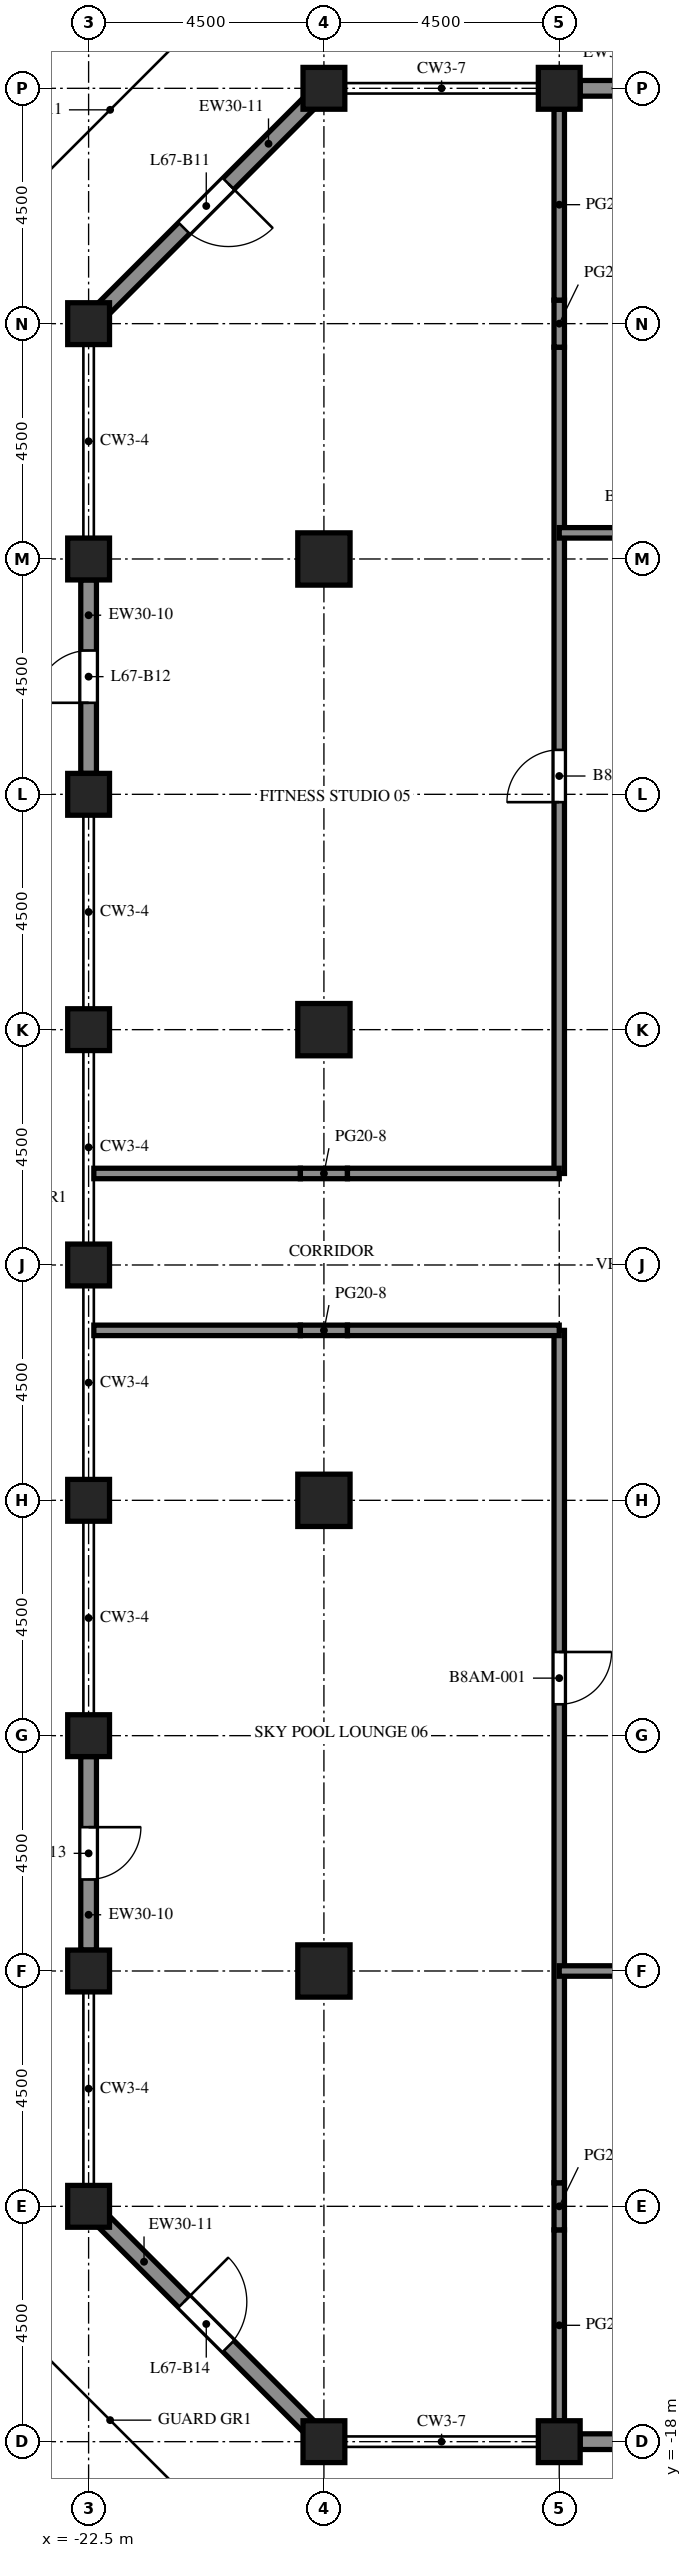
"""IFC4 building model, lengths in metres.
Left out: names, types, materials, properties, quantities, classifications, styles, units other than length and angle.
Written with IfcOpenShell. Run it as: python <this file> out.ifc"""

import sys

from ifc_helpers import new_model, si_unit, direction, frame, frame_2d, origin, origin_2d, place, context, subcontext, project, spatial, rectangle, extrude, element, fill, save


model = new_model("IFC4")
c1 = context("Model", 3, precision=1e-05, world=origin(), true_north=direction((0.0, 1.0)))
c2 = subcontext(c1, "Body", "Model", "MODEL_VIEW")
j1 = project(units=[si_unit("LENGTHUNIT", "METRE"), si_unit("PLANEANGLEUNIT", "RADIAN")], contexts=[c1])
p1 = place(None, origin())
s1 = spatial("IfcSite", under=j1, at=p1, CompositionType="ELEMENT")
p2 = place(p1, origin())
s2 = spatial("IfcBuilding", under=s1, at=p2, CompositionType="ELEMENT")
p3 = place(p2, frame((0.0, 0.0, 295.0)))
s3 = spatial("IfcBuildingStorey", under=s2, at=p3, CompositionType="ELEMENT", Elevation=295.0)
for number, where, z_axis, x_axis in (
    (1, (-22.5, -13.5, 0.0), (0.0, 0.0, 1.0), (1.0, 0.0, 0.0)),
    (2, (-22.5, -9.0, 0.0), (0.0, 0.0, 1.0), (1.0, 0.0, 0.0)),
    (3, (-22.5, -4.5, 0.0), (0.0, 0.0, 1.0), (1.0, 0.0, 0.0)),
    (4, (-22.5, 0.0, 0.0), (0.0, 0.0, 1.0), (1.0, 0.0, 0.0)),
    (5, (-22.5, 4.5, 0.0), (0.0, 0.0, 1.0), (1.0, 0.0, 0.0)),
    (6, (-22.5, 9.0, 0.0), (0.0, 0.0, 1.0), (1.0, 0.0, 0.0)),
    (7, (-22.5, 13.5, 0.0), (0.0, 0.0, 1.0), (1.0, 0.0, 0.0)),
    (8, (-22.5, 18.0, 0.0), (0.0, 0.0, 1.0), (1.0, 0.0, 0.0)),
    (9, (-22.5, 22.5, 0.0), (0.0, 0.0, 1.0), (1.0, 0.0, 0.0)),
):
    element("IfcColumn", number, at=place(p3, frame(where, z_axis=z_axis, x_axis=x_axis)), inside=s3, PredefinedType="COLUMN", context=c2, shape_type="SweptSolid", body=[
        extrude(rectangle(XDim=0.8, YDim=0.8, at=origin_2d()), origin(), (0.0, 0.0, 1.0), 6.0),
    ])
for number, where, z_axis, x_axis in (
    (10, (-18.0, -18.0, 0.0), (0.0, 0.0, 1.0), (1.0, 0.0, 0.0)),
    (11, (-18.0, 27.0, 0.0), (0.0, 0.0, 1.0), (1.0, 0.0, 0.0)),
):
    element("IfcColumn", number, at=place(p3, frame(where, z_axis=z_axis, x_axis=x_axis)), inside=s3, PredefinedType="COLUMN", context=c2, shape_type="SweptSolid", body=[
        extrude(rectangle(XDim=0.8, YDim=0.8, at=origin_2d()), origin(), (0.0, 0.0, 1.0), 3.6),
    ])
for number, where, z_axis, x_axis in (
    (12, (-13.5, -18.0, 0.0), (0.0, 0.0, 1.0), (1.0, 0.0, 0.0)),
    (13, (-13.5, 27.0, 0.0), (0.0, 0.0, 1.0), (1.0, 0.0, 0.0)),
):
    element("IfcColumn", number, at=place(p3, frame(where, z_axis=z_axis, x_axis=x_axis)), inside=s3, PredefinedType="COLUMN", context=c2, shape_type="SweptSolid", body=[
        extrude(rectangle(XDim=0.8, YDim=0.8, at=origin_2d()), origin(), (0.0, 0.0, 1.0), 6.0),
    ])
for number, where, z_axis, x_axis in (
    (14, (-18.0, -9.0, 0.0), (0.0, 0.0, 1.0), (1.0, 0.0, 0.0)),
    (15, (-18.0, 0.0, 0.0), (0.0, 0.0, 1.0), (1.0, 0.0, 0.0)),
    (16, (-18.0, 9.0, 0.0), (0.0, 0.0, 1.0), (1.0, 0.0, 0.0)),
    (17, (-18.0, 18.0, 0.0), (0.0, 0.0, 1.0), (1.0, 0.0, 0.0)),
):
    element("IfcColumn", number, at=place(p3, frame(where, z_axis=z_axis, x_axis=x_axis)), inside=s3, PredefinedType="COLUMN", context=c2, shape_type="SweptSolid", body=[
        extrude(rectangle(XDim=1.0, YDim=1.0, at=origin_2d()), origin(), (0.0, 0.0, 1.0), 5.4),
    ])
p4 = place(p3, frame((-9.4, -18.0, 0.0), z_axis=(0.0, 0.0, 1.0), x_axis=(-1.0, 0.0, 0.0)))
e18 = element("IfcWall", 18, at=p4, inside=s3, PredefinedType="SOLIDWALL", context=c2, shape_type="SweptSolid", body=[
    extrude(rectangle(XDim=3.7, YDim=0.3, at=frame_2d((1.85, 0.0))), origin(), (0.0, 0.0, 1.0), 3.6),
])
p5 = place(p4, frame((1.35, 0.0, 0.0)))
e19 = element("IfcOpeningElement", 19, at=p5, cuts=e18, PredefinedType="OPENING", context=c2, shape_type="SweptSolid", body=[
    extrude(rectangle(XDim=1.0, YDim=2.2, at=frame_2d((0.5, 1.1))), frame((0.0, 0.16, 0.0), z_axis=(0.0, -1.0, 0.0), x_axis=(1.0, 0.0, 0.0)), (0.0, 0.0, 1.0), 0.32),
])
p6 = place(p3, frame((-13.1, 27.0, 0.0), z_axis=(0.0, 0.0, 1.0), x_axis=(1.0, 0.0, 0.0)))
e20 = element("IfcWall", 20, at=p6, inside=s3, PredefinedType="SOLIDWALL", context=c2, shape_type="SweptSolid", body=[
    extrude(rectangle(XDim=3.7, YDim=0.3, at=frame_2d((1.85, 0.0))), origin(), (0.0, 0.0, 1.0), 4.6),
])
p7 = place(p6, frame((1.35, 0.0, 0.0)))
e21 = element("IfcOpeningElement", 21, at=p7, cuts=e20, PredefinedType="OPENING", context=c2, shape_type="SweptSolid", body=[
    extrude(rectangle(XDim=1.0, YDim=2.2, at=frame_2d((0.5, 1.1))), frame((0.0, 0.16, 0.0), z_axis=(0.0, -1.0, 0.0), x_axis=(1.0, 0.0, 0.0)), (0.0, 0.0, 1.0), 0.32),
])
p8 = place(p3, frame((-22.206, 22.794, 0.0), z_axis=(0.0, 0.0, 1.0), x_axis=(0.707106781187, 0.707106781187, 0.0)))
e22 = element("IfcWall", 22, at=p8, inside=s3, PredefinedType="SOLIDWALL", context=c2, shape_type="SweptSolid", body=[
    extrude(rectangle(XDim=5.532, YDim=0.3, at=frame_2d((2.766, 0.0))), origin(), (0.0, 0.0, 1.0), 3.6),
])
p9 = place(p8, frame((2.166, 0.0, 0.0)))
e23 = element("IfcOpeningElement", 23, at=p9, cuts=e22, PredefinedType="OPENING", context=c2, shape_type="SweptSolid", body=[
    extrude(rectangle(XDim=1.2, YDim=2.2, at=frame_2d((0.6, 1.1))), frame((0.0, 0.16, 0.0), z_axis=(0.0, -1.0, 0.0), x_axis=(1.0, 0.0, 0.0)), (0.0, 0.0, 1.0), 0.32),
])
p10 = place(p3, frame((-22.5, 13.9, 0.0), z_axis=(0.0, 0.0, 1.0), x_axis=(0.0, 1.0, 0.0)))
e24 = element("IfcWall", 24, at=p10, inside=s3, PredefinedType="SOLIDWALL", context=c2, shape_type="SweptSolid", body=[
    extrude(rectangle(XDim=3.7, YDim=0.3, at=frame_2d((1.85, 0.0))), origin(), (0.0, 0.0, 1.0), 4.6),
])
p11 = place(p10, frame((1.35, 0.0, 0.0)))
e25 = element("IfcOpeningElement", 25, at=p11, cuts=e24, PredefinedType="OPENING", context=c2, shape_type="SweptSolid", body=[
    extrude(rectangle(XDim=1.0, YDim=2.2, at=frame_2d((0.5, 1.1))), frame((0.0, 0.16, 0.0), z_axis=(0.0, -1.0, 0.0), x_axis=(1.0, 0.0, 0.0)), (0.0, 0.0, 1.0), 0.32),
])
p12 = place(p3, frame((-22.5, -8.6, 0.0), z_axis=(0.0, 0.0, 1.0), x_axis=(0.0, 1.0, 0.0)))
e26 = element("IfcWall", 26, at=p12, inside=s3, PredefinedType="SOLIDWALL", context=c2, shape_type="SweptSolid", body=[
    extrude(rectangle(XDim=3.7, YDim=0.3, at=frame_2d((1.85, 0.0))), origin(), (0.0, 0.0, 1.0), 4.6),
])
p13 = place(p12, frame((1.35, 0.0, 0.0)))
e27 = element("IfcOpeningElement", 27, at=p13, cuts=e26, PredefinedType="OPENING", context=c2, shape_type="SweptSolid", body=[
    extrude(rectangle(XDim=1.0, YDim=2.2, at=frame_2d((0.5, 1.1))), frame((0.0, 0.16, 0.0), z_axis=(0.0, -1.0, 0.0), x_axis=(1.0, 0.0, 0.0)), (0.0, 0.0, 1.0), 0.32),
])
p14 = place(p3, frame((-18.294, -17.706, 0.0), z_axis=(0.0, 0.0, 1.0), x_axis=(-0.707106781187, 0.707106781187, 0.0)))
e28 = element("IfcWall", 28, at=p14, inside=s3, PredefinedType="SOLIDWALL", context=c2, shape_type="SweptSolid", body=[
    extrude(rectangle(XDim=5.532, YDim=0.3, at=frame_2d((2.766, 0.0))), origin(), (0.0, 0.0, 1.0), 3.6),
])
p15 = place(p14, frame((2.166, 0.0, 0.0)))
e29 = element("IfcOpeningElement", 29, at=p15, cuts=e28, PredefinedType="OPENING", context=c2, shape_type="SweptSolid", body=[
    extrude(rectangle(XDim=1.2, YDim=2.2, at=frame_2d((0.6, 1.1))), frame((0.0, 0.16, 0.0), z_axis=(0.0, -1.0, 0.0), x_axis=(1.0, 0.0, 0.0)), (0.0, 0.0, 1.0), 0.32),
])
p16 = place(p3, frame((-13.5, -17.6, 0.0), z_axis=(0.0, 0.0, 1.0), x_axis=(0.0, 1.0, 0.0)))
e30 = element("IfcWall", 30, at=p16, inside=s3, PredefinedType="PARTITIONING", context=c2, shape_type="SweptSolid", body=[
    extrude(rectangle(XDim=3.65, YDim=0.2, at=frame_2d((1.825, 0.0))), origin(), (0.0, 0.0, 1.0), 4.77),
])
p17 = place(p3, frame((-13.5, -13.95, 0.0), z_axis=(0.0, 0.0, 1.0), x_axis=(0.0, 1.0, 0.0)))
e31 = element("IfcWall", 31, at=p17, inside=s3, PredefinedType="PARTITIONING", context=c2, shape_type="SweptSolid", body=[
    extrude(rectangle(XDim=0.9, YDim=0.2, at=frame_2d((0.45, 0.0))), origin(), (0.0, 0.0, 1.0), 3.57),
])
p18 = place(p3, frame((-13.5, -13.05, 0.0), z_axis=(0.0, 0.0, 1.0), x_axis=(0.0, 1.0, 0.0)))
e32 = element("IfcWall", 32, at=p18, inside=s3, PredefinedType="PARTITIONING", context=c2, shape_type="SweptSolid", body=[
    extrude(rectangle(XDim=16.3, YDim=0.2, at=frame_2d((8.15, 0.0))), origin(), (0.0, 0.0, 1.0), 5.4),
])
p19 = place(p18, frame((9.15, 0.0, 0.0)))
e33 = element("IfcOpeningElement", 33, at=p19, cuts=e32, PredefinedType="OPENING", context=c2, shape_type="SweptSolid", body=[
    extrude(rectangle(XDim=1.0, YDim=2.1, at=frame_2d((0.5, 1.05))), frame((0.0, 0.11, 0.0), z_axis=(0.0, -1.0, 0.0), x_axis=(1.0, 0.0, 0.0)), (0.0, 0.0, 1.0), 0.22),
])
p20 = place(p3, frame((-13.5, 6.25, 0.0), z_axis=(0.0, 0.0, 1.0), x_axis=(0.0, 1.0, 0.0)))
e34 = element("IfcWall", 34, at=p20, inside=s3, PredefinedType="PARTITIONING", context=c2, shape_type="SweptSolid", body=[
    extrude(rectangle(XDim=15.8, YDim=0.2, at=frame_2d((7.9, 0.0))), origin(), (0.0, 0.0, 1.0), 5.4),
])
p21 = place(p20, frame((7.1, 0.0, 0.0)))
e35 = element("IfcOpeningElement", 35, at=p21, cuts=e34, PredefinedType="OPENING", context=c2, shape_type="SweptSolid", body=[
    extrude(rectangle(XDim=1.0, YDim=2.1, at=frame_2d((0.5, 1.05))), frame((0.0, 0.11, 0.0), z_axis=(0.0, -1.0, 0.0), x_axis=(1.0, 0.0, 0.0)), (0.0, 0.0, 1.0), 0.22),
])
p22 = place(p3, frame((-13.5, 22.05, 0.0), z_axis=(0.0, 0.0, 1.0), x_axis=(0.0, 1.0, 0.0)))
e36 = element("IfcWall", 36, at=p22, inside=s3, PredefinedType="PARTITIONING", context=c2, shape_type="SweptSolid", body=[
    extrude(rectangle(XDim=0.9, YDim=0.2, at=frame_2d((0.45, 0.0))), origin(), (0.0, 0.0, 1.0), 3.57),
])
p23 = place(p3, frame((-13.5, 22.95, 0.0), z_axis=(0.0, 0.0, 1.0), x_axis=(0.0, 1.0, 0.0)))
e37 = element("IfcWall", 37, at=p23, inside=s3, PredefinedType="PARTITIONING", context=c2, shape_type="SweptSolid", body=[
    extrude(rectangle(XDim=3.65, YDim=0.2, at=frame_2d((1.825, 0.0))), origin(), (0.0, 0.0, 1.0), 4.77),
])
p24 = place(p3, frame((-10.5, -9.0, 0.0), z_axis=(0.0, 0.0, 1.0), x_axis=(-1.0, 0.0, 0.0)))
e38 = element("IfcWall", 38, at=p24, inside=s3, PredefinedType="PARTITIONING", context=c2, shape_type="SweptSolid", body=[
    extrude(rectangle(XDim=3.0, YDim=0.2, at=frame_2d((1.5, 0.0))), origin(), (0.0, 0.0, 1.0), 5.4),
])
p25 = place(p24, frame((0.65, 0.0, 0.0)))
e39 = element("IfcOpeningElement", 39, at=p25, cuts=e38, PredefinedType="OPENING", context=c2, shape_type="SweptSolid", body=[
    extrude(rectangle(XDim=1.0, YDim=2.1, at=frame_2d((0.5, 1.05))), frame((0.0, 0.11, 0.0), z_axis=(0.0, -1.0, 0.0), x_axis=(1.0, 0.0, 0.0)), (0.0, 0.0, 1.0), 0.22),
])
p26 = place(p3, frame((-22.4, 3.25, 0.0), z_axis=(0.0, 0.0, 1.0), x_axis=(1.0, 0.0, 0.0)))
e40 = element("IfcWall", 40, at=p26, inside=s3, PredefinedType="PARTITIONING", context=c2, shape_type="SweptSolid", body=[
    extrude(rectangle(XDim=3.95, YDim=0.2, at=frame_2d((1.975, 0.0))), origin(), (0.0, 0.0, 1.0), 5.4),
])
p27 = place(p3, frame((-18.45, 3.25, 0.0), z_axis=(0.0, 0.0, 1.0), x_axis=(1.0, 0.0, 0.0)))
e41 = element("IfcWall", 41, at=p27, inside=s3, PredefinedType="PARTITIONING", context=c2, shape_type="SweptSolid", body=[
    extrude(rectangle(XDim=0.9, YDim=0.2, at=frame_2d((0.45, 0.0))), origin(), (0.0, 0.0, 1.0), 3.57),
])
p28 = place(p3, frame((-17.55, 3.25, 0.0), z_axis=(0.0, 0.0, 1.0), x_axis=(1.0, 0.0, 0.0)))
e42 = element("IfcWall", 42, at=p28, inside=s3, PredefinedType="PARTITIONING", context=c2, shape_type="SweptSolid", body=[
    extrude(rectangle(XDim=4.05, YDim=0.2, at=frame_2d((2.025, 0.0))), origin(), (0.0, 0.0, 1.0), 5.4),
])
p29 = place(p3, frame((-22.4, 6.25, 0.0), z_axis=(0.0, 0.0, 1.0), x_axis=(1.0, 0.0, 0.0)))
e43 = element("IfcWall", 43, at=p29, inside=s3, PredefinedType="PARTITIONING", context=c2, shape_type="SweptSolid", body=[
    extrude(rectangle(XDim=3.95, YDim=0.2, at=frame_2d((1.975, 0.0))), origin(), (0.0, 0.0, 1.0), 5.4),
])
p30 = place(p3, frame((-18.45, 6.25, 0.0), z_axis=(0.0, 0.0, 1.0), x_axis=(1.0, 0.0, 0.0)))
e44 = element("IfcWall", 44, at=p30, inside=s3, PredefinedType="PARTITIONING", context=c2, shape_type="SweptSolid", body=[
    extrude(rectangle(XDim=0.9, YDim=0.2, at=frame_2d((0.45, 0.0))), origin(), (0.0, 0.0, 1.0), 3.57),
])
p31 = place(p3, frame((-17.55, 6.25, 0.0), z_axis=(0.0, 0.0, 1.0), x_axis=(1.0, 0.0, 0.0)))
e45 = element("IfcWall", 45, at=p31, inside=s3, PredefinedType="PARTITIONING", context=c2, shape_type="SweptSolid", body=[
    extrude(rectangle(XDim=4.05, YDim=0.2, at=frame_2d((2.025, 0.0))), origin(), (0.0, 0.0, 1.0), 5.4),
])
p32 = place(p3, frame((-13.5, 18.5, 0.0), z_axis=(0.0, 0.0, 1.0), x_axis=(1.0, 0.0, 0.0)))
e46 = element("IfcWall", 46, at=p32, inside=s3, PredefinedType="PARTITIONING", context=c2, shape_type="SweptSolid", body=[
    extrude(rectangle(XDim=3.0, YDim=0.2, at=frame_2d((1.5, 0.0))), origin(), (0.0, 0.0, 1.0), 5.4),
])
p33 = place(p32, frame((1.1, 0.0, 0.0)))
e47 = element("IfcOpeningElement", 47, at=p33, cuts=e46, PredefinedType="OPENING", context=c2, shape_type="SweptSolid", body=[
    extrude(rectangle(XDim=1.0, YDim=2.1, at=frame_2d((0.5, 1.05))), frame((0.0, 0.11, 0.0), z_axis=(0.0, -1.0, 0.0), x_axis=(1.0, 0.0, 0.0)), (0.0, 0.0, 1.0), 0.22),
])
p34 = place(p9, origin())
e48 = element("IfcDoor", 48, at=p34, inside=s3, OperationType="SINGLE_SWING_RIGHT", PredefinedType="DOOR", context=c2, shape_type="SweptSolid", body=[
    extrude(rectangle(XDim=1.2, YDim=2.2, at=frame_2d((0.6, 1.1))), frame((0.0, 0.025, 0.0), z_axis=(0.0, -1.0, 0.0), x_axis=(1.0, 0.0, 0.0)), (0.0, 0.0, 1.0), 0.05),
])
fill(e23, e48)
p35 = place(p11, origin())
e49 = element("IfcDoor", 49, at=p35, inside=s3, OperationType="SINGLE_SWING_LEFT", PredefinedType="DOOR", context=c2, shape_type="SweptSolid", body=[
    extrude(rectangle(XDim=1.0, YDim=2.2, at=frame_2d((0.5, 1.1))), frame((0.0, 0.025, 0.0), z_axis=(0.0, -1.0, 0.0), x_axis=(1.0, 0.0, 0.0)), (0.0, 0.0, 1.0), 0.05),
])
fill(e25, e49)
p36 = place(p13, origin())
e50 = element("IfcDoor", 50, at=p36, inside=s3, OperationType="SINGLE_SWING_RIGHT", PredefinedType="DOOR", context=c2, shape_type="SweptSolid", body=[
    extrude(rectangle(XDim=1.0, YDim=2.2, at=frame_2d((0.5, 1.1))), frame((0.0, 0.025, 0.0), z_axis=(0.0, -1.0, 0.0), x_axis=(1.0, 0.0, 0.0)), (0.0, 0.0, 1.0), 0.05),
])
fill(e27, e50)
p37 = place(p15, origin())
e51 = element("IfcDoor", 51, at=p37, inside=s3, OperationType="SINGLE_SWING_RIGHT", PredefinedType="DOOR", context=c2, shape_type="SweptSolid", body=[
    extrude(rectangle(XDim=1.2, YDim=2.2, at=frame_2d((0.6, 1.1))), frame((0.0, 0.025, 0.0), z_axis=(0.0, -1.0, 0.0), x_axis=(1.0, 0.0, 0.0)), (0.0, 0.0, 1.0), 0.05),
])
fill(e29, e51)
p38 = place(p19, origin())
e52 = element("IfcDoor", 52, at=p38, inside=s3, OperationType="SINGLE_SWING_RIGHT", PredefinedType="DOOR", context=c2, shape_type="SweptSolid", body=[
    extrude(rectangle(XDim=1.0, YDim=2.1, at=frame_2d((0.5, 1.05))), frame((0.0, 0.025, 0.0), z_axis=(0.0, -1.0, 0.0), x_axis=(1.0, 0.0, 0.0)), (0.0, 0.0, 1.0), 0.05),
])
fill(e33, e52)
p39 = place(p21, origin())
e53 = element("IfcDoor", 53, at=p39, inside=s3, OperationType="SINGLE_SWING_LEFT", PredefinedType="DOOR", context=c2, shape_type="SweptSolid", body=[
    extrude(rectangle(XDim=1.0, YDim=2.1, at=frame_2d((0.5, 1.05))), frame((0.0, 0.025, 0.0), z_axis=(0.0, -1.0, 0.0), x_axis=(1.0, 0.0, 0.0)), (0.0, 0.0, 1.0), 0.05),
])
fill(e35, e53)
save(model, sys.argv[1])
